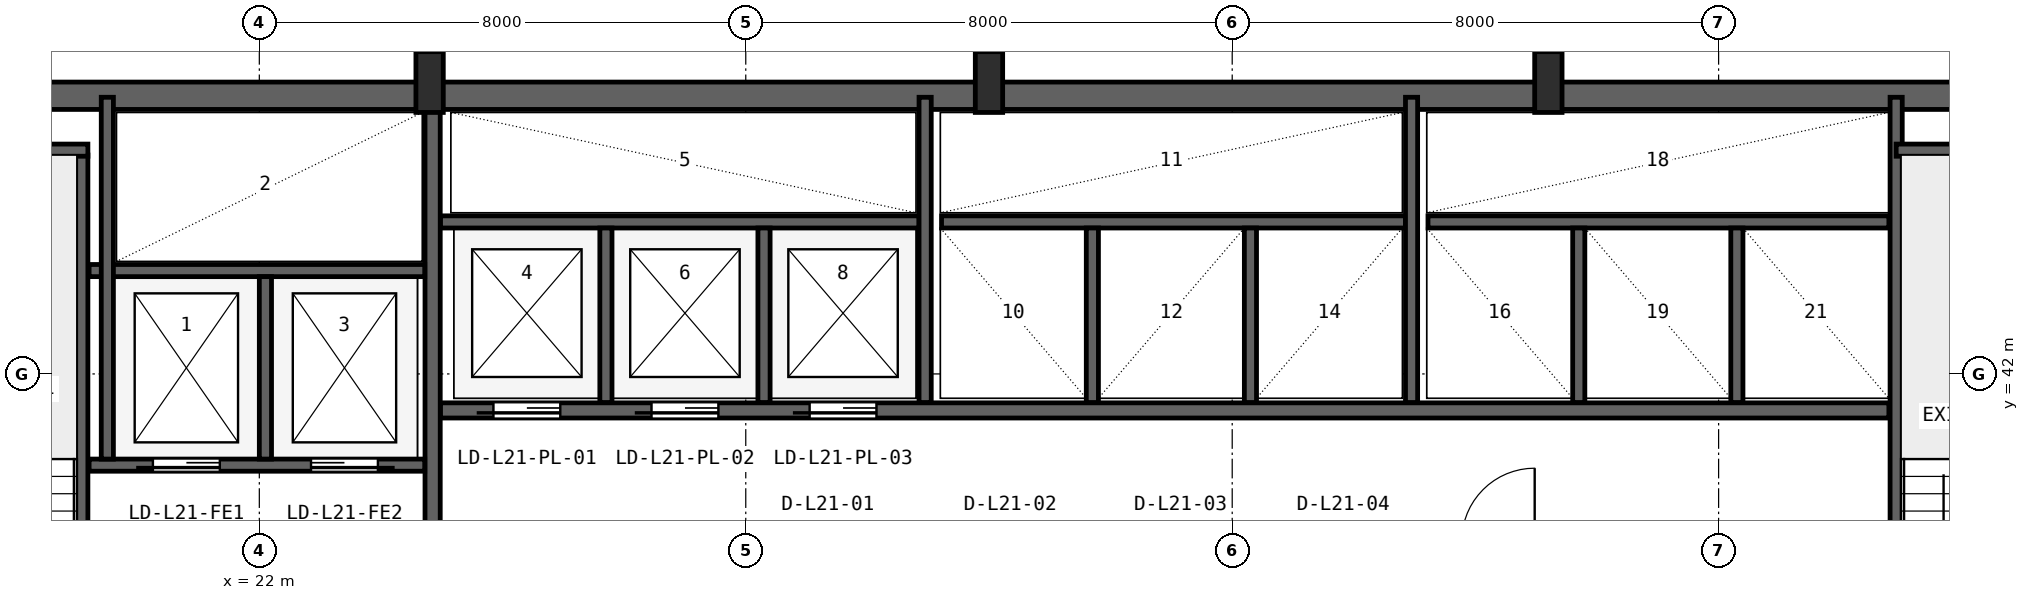
"""IFC4 building model, lengths in metres.
Left out: names, types, materials, properties, quantities, classifications, styles, units other than length and angle.
Written with IfcOpenShell. Run it as: python <this file> out.ifc"""

import sys

from ifc_helpers import new_model, si_unit, direction, frame, frame_2d, origin, origin_2d, place, context, subcontext, project, spatial, rectangle, i_section, extrude, source, transform, mapped, element, fill, save


model = new_model("IFC4")
c1 = context("Model", 3, precision=1e-05, world=origin(), true_north=direction((0.0, 1.0)))
c2 = subcontext(c1, "Body", "Model", "MODEL_VIEW")
j1 = project(units=[si_unit("LENGTHUNIT", "METRE"), si_unit("PLANEANGLEUNIT", "RADIAN")], contexts=[c1])
p1 = place(None, origin())
s1 = spatial("IfcSite", under=j1, at=p1, CompositionType="ELEMENT")
p2 = place(p1, origin())
s2 = spatial("IfcBuilding", under=s1, at=p2, CompositionType="ELEMENT")
p3 = place(p2, frame((0.0, 0.0, 90.8)))
s3 = spatial("IfcBuildingStorey", under=s2, at=p3, CompositionType="ELEMENT", Elevation=90.8)
p4 = place(p3, frame((15.6, 46.575, 0.0), z_axis=(0.0, 0.0, 1.0), x_axis=(1.0, 0.0, 0.0)))
e1 = element("IfcWall", 1, at=p4, inside=s3, PredefinedType="SHEAR", context=c2, shape_type="SweptSolid", body=[
    extrude(rectangle(XDim=36.8, YDim=0.45, at=frame_2d((18.4, 0.0))), origin(), (0.0, 0.0, 1.0), 3.55),
])
m1 = source(origin(), c2, "Body", "SweptSolid", [
    extrude(i_section(OverallWidth=0.45, OverallDepth=1.0, WebThickness=0.016, FlangeThickness=0.03, FilletRadius=0.016, at=origin_2d()), origin(), (0.0, 0.0, 1.0), 3.8),
])
for number, where, z_axis, x_axis in (
    (2, (24.8, 46.8, 0.0), (0.0, 0.0, 1.0), (1.0, 0.0, 0.0)),
    (3, (34.0, 46.8, 0.0), (0.0, 0.0, 1.0), (1.0, 0.0, 0.0)),
    (4, (43.2, 46.8, 0.0), (0.0, 0.0, 1.0), (1.0, 0.0, 0.0)),
):
    element("IfcColumn", number, at=place(p3, frame(where, z_axis=z_axis, x_axis=x_axis)), inside=s3, PredefinedType="COLUMN", context=c2, shape_type="MappedRepresentation", body=[
        mapped(m1, transform((0.0, 0.0, 0.0), x_axis=(1.0, 0.0, 0.0), y_axis=(0.0, 1.0, 0.0), z_axis=(0.0, 0.0, 1.0), scale=1.0)),
    ])
p5 = place(p3, frame((19.08, 35.95, 0.0), z_axis=(0.0, 0.0, 1.0), x_axis=(0.0, 1.0, 0.0)))
e5 = element("IfcWall", 5, at=p5, inside=s3, PredefinedType="SHEAR", context=c2, shape_type="SweptSolid", body=[
    extrude(rectangle(XDim=9.65, YDim=0.2, at=frame_2d((4.825, 0.0))), origin(), (0.0, 0.0, 1.0), 3.55),
])
p6 = place(p5, frame((0.25, 0.0, 0.0)))
e6 = element("IfcOpeningElement", 6, at=p6, cuts=e5, PredefinedType="OPENING", context=c2, shape_type="SweptSolid", body=[
    extrude(rectangle(XDim=0.95, YDim=2.1, at=frame_2d((0.475, 1.05))), frame((0.0, 0.11, 0.0), z_axis=(0.0, -1.0, 0.0), x_axis=(1.0, 0.0, 0.0)), (0.0, 0.0, 1.0), 0.22),
])
p7 = place(p3, frame((15.95, 45.68, 0.0), z_axis=(0.0, 0.0, 1.0), x_axis=(1.0, 0.0, 0.0)))
e7 = element("IfcWall", 7, at=p7, inside=s3, PredefinedType="SHEAR", context=c2, shape_type="SweptSolid", body=[
    extrude(rectangle(XDim=3.23, YDim=0.2, at=frame_2d((1.615, 0.0))), origin(), (0.0, 0.0, 1.0), 3.55),
])
p8 = place(p3, frame((24.85, 36.05, 0.0), z_axis=(0.0, 0.0, 1.0), x_axis=(0.0, 1.0, 0.0)))
e8 = element("IfcWall", 8, at=p8, inside=s3, PredefinedType="SHEAR", context=c2, shape_type="SweptSolid", body=[
    extrude(rectangle(XDim=10.45, YDim=0.25, at=frame_2d((5.225, 0.0))), origin(), (0.0, 0.0, 1.0), 3.55),
])
p9 = place(p3, frame((19.2, 40.5, 0.0), z_axis=(0.0, 0.0, 1.0), x_axis=(1.0, 0.0, 0.0)))
e9 = element("IfcWall", 9, at=p9, inside=s3, PredefinedType="SHEAR", context=c2, shape_type="SweptSolid", body=[
    extrude(rectangle(XDim=5.52, YDim=0.2, at=frame_2d((2.76, 0.0))), origin(), (0.0, 0.0, 1.0), 3.55),
])
p10 = place(p9, frame((1.05, 0.0, 0.0)))
e10 = element("IfcOpeningElement", 10, at=p10, cuts=e9, PredefinedType="OPENING", context=c2, shape_type="SweptSolid", body=[
    extrude(rectangle(XDim=1.1, YDim=2.18, at=frame_2d((0.55, 1.09))), frame((0.0, 0.11, 0.0), z_axis=(0.0, -1.0, 0.0), x_axis=(1.0, 0.0, 0.0)), (0.0, 0.0, 1.0), 0.22),
])
p11 = place(p9, frame((3.65, 0.0, 0.0)))
e11 = element("IfcOpeningElement", 11, at=p11, cuts=e9, PredefinedType="OPENING", context=c2, shape_type="SweptSolid", body=[
    extrude(rectangle(XDim=1.1, YDim=2.18, at=frame_2d((0.55, 1.09))), frame((0.0, 0.11, 0.0), z_axis=(0.0, -1.0, 0.0), x_axis=(1.0, 0.0, 0.0)), (0.0, 0.0, 1.0), 0.22),
])
p12 = place(p3, frame((19.2, 43.7, 0.0), z_axis=(0.0, 0.0, 1.0), x_axis=(1.0, 0.0, 0.0)))
e12 = element("IfcWall", 12, at=p12, inside=s3, PredefinedType="SHEAR", context=c2, shape_type="SweptSolid", body=[
    extrude(rectangle(XDim=5.52, YDim=0.2, at=frame_2d((2.76, 0.0))), origin(), (0.0, 0.0, 1.0), 3.55),
])
p13 = place(p3, frame((22.1, 40.6, 0.0), z_axis=(0.0, 0.0, 1.0), x_axis=(0.0, 1.0, 0.0)))
e13 = element("IfcWall", 13, at=p13, inside=s3, PredefinedType="SHEAR", context=c2, shape_type="SweptSolid", body=[
    extrude(rectangle(XDim=3.0, YDim=0.2, at=frame_2d((1.5, 0.0))), origin(), (0.0, 0.0, 1.0), 3.55),
])
p14 = place(p3, frame((19.5, 40.6, 0.0), z_axis=(0.0, 0.0, 1.0), x_axis=(0.0, 1.0, 0.0)))
e14 = element("IfcWall", 14, at=p14, inside=s3, PredefinedType="SHEAR", context=c2, shape_type="SweptSolid", body=[
    extrude(rectangle(XDim=5.95, YDim=0.2, at=frame_2d((2.975, 0.0))), origin(), (0.0, 0.0, 1.0), 3.55),
])
p15 = place(p3, frame((48.92, 36.05, 0.0), z_axis=(0.0, 0.0, 1.0), x_axis=(0.0, 1.0, 0.0)))
e15 = element("IfcWall", 15, at=p15, inside=s3, PredefinedType="SHEAR", context=c2, shape_type="SweptSolid", body=[
    extrude(rectangle(XDim=10.5, YDim=0.2, at=frame_2d((5.25, 0.0))), origin(), (0.0, 0.0, 1.0), 3.55),
])
p16 = place(p3, frame((48.92, 45.68, 0.0), z_axis=(0.0, 0.0, 1.0), x_axis=(1.0, 0.0, 0.0)))
e16 = element("IfcWall", 16, at=p16, inside=s3, PredefinedType="SHEAR", context=c2, shape_type="SweptSolid", body=[
    extrude(rectangle(XDim=3.18, YDim=0.2, at=frame_2d((1.59, 0.0))), origin(), (0.0, 0.0, 1.0), 3.55),
])
p17 = place(p3, frame((24.98, 41.4, 0.0), z_axis=(0.0, 0.0, 1.0), x_axis=(1.0, 0.0, 0.0)))
e17 = element("IfcWall", 17, at=p17, inside=s3, PredefinedType="SHEAR", context=c2, shape_type="SweptSolid", body=[
    extrude(rectangle(XDim=23.82, YDim=0.25, at=frame_2d((11.91, 0.0))), origin(), (0.0, 0.0, 1.0), 3.55),
])
p18 = place(p17, frame((0.87, 0.0, 0.0)))
e18 = element("IfcOpeningElement", 18, at=p18, cuts=e17, PredefinedType="OPENING", context=c2, shape_type="SweptSolid", body=[
    extrude(rectangle(XDim=1.1, YDim=2.18, at=frame_2d((0.55, 1.09))), frame((0.0, 0.135, 0.0), z_axis=(0.0, -1.0, 0.0), x_axis=(1.0, 0.0, 0.0)), (0.0, 0.0, 1.0), 0.27),
])
p19 = place(p17, frame((3.47, 0.0, 0.0)))
e19 = element("IfcOpeningElement", 19, at=p19, cuts=e17, PredefinedType="OPENING", context=c2, shape_type="SweptSolid", body=[
    extrude(rectangle(XDim=1.1, YDim=2.18, at=frame_2d((0.55, 1.09))), frame((0.0, 0.135, 0.0), z_axis=(0.0, -1.0, 0.0), x_axis=(1.0, 0.0, 0.0)), (0.0, 0.0, 1.0), 0.27),
])
p20 = place(p17, frame((6.07, 0.0, 0.0)))
e20 = element("IfcOpeningElement", 20, at=p20, cuts=e17, PredefinedType="OPENING", context=c2, shape_type="SweptSolid", body=[
    extrude(rectangle(XDim=1.1, YDim=2.18, at=frame_2d((0.55, 1.09))), frame((0.0, 0.135, 0.0), z_axis=(0.0, -1.0, 0.0), x_axis=(1.0, 0.0, 0.0)), (0.0, 0.0, 1.0), 0.27),
])
p21 = place(p3, frame((24.98, 44.5, 0.0), z_axis=(0.0, 0.0, 1.0), x_axis=(1.0, 0.0, 0.0)))
e21 = element("IfcWall", 21, at=p21, inside=s3, PredefinedType="SHEAR", context=c2, shape_type="SweptSolid", body=[
    extrude(rectangle(XDim=7.87, YDim=0.2, at=frame_2d((3.935, 0.0))), origin(), (0.0, 0.0, 1.0), 3.55),
])
for number, where, z_axis, x_axis in (
    (22, (27.7, 41.53, 0.0), (0.0, 0.0, 1.0), (0.0, 1.0, 0.0)),
    (23, (30.3, 41.53, 0.0), (0.0, 0.0, 1.0), (0.0, 1.0, 0.0)),
):
    element("IfcWall", number, at=place(p3, frame(where, z_axis=z_axis, x_axis=x_axis)), inside=s3, PredefinedType="SHEAR", context=c2, shape_type="SweptSolid", body=[
        extrude(rectangle(XDim=2.87, YDim=0.2, at=frame_2d((1.435, 0.0))), origin(), (0.0, 0.0, 1.0), 3.55),
    ])
p22 = place(p3, frame((32.95, 41.53, 0.0), z_axis=(0.0, 0.0, 1.0), x_axis=(0.0, 1.0, 0.0)))
e24 = element("IfcWall", 24, at=p22, inside=s3, PredefinedType="SHEAR", context=c2, shape_type="SweptSolid", body=[
    extrude(rectangle(XDim=5.02, YDim=0.2, at=frame_2d((2.51, 0.0))), origin(), (0.0, 0.0, 1.0), 3.55),
])
p23 = place(p3, frame((33.22, 44.5, 0.0), z_axis=(0.0, 0.0, 1.0), x_axis=(1.0, 0.0, 0.0)))
e25 = element("IfcWall", 25, at=p23, inside=s3, PredefinedType="SHEAR", context=c2, shape_type="SweptSolid", body=[
    extrude(rectangle(XDim=7.63, YDim=0.2, at=frame_2d((3.815, 0.0))), origin(), (0.0, 0.0, 1.0), 3.55),
])
for number, where, z_axis, x_axis in (
    (26, (35.7, 41.53, 0.0), (0.0, 0.0, 1.0), (0.0, 1.0, 0.0)),
    (27, (38.3, 41.53, 0.0), (0.0, 0.0, 1.0), (0.0, 1.0, 0.0)),
):
    element("IfcWall", number, at=place(p3, frame(where, z_axis=z_axis, x_axis=x_axis)), inside=s3, PredefinedType="SHEAR", context=c2, shape_type="SweptSolid", body=[
        extrude(rectangle(XDim=2.87, YDim=0.2, at=frame_2d((1.435, 0.0))), origin(), (0.0, 0.0, 1.0), 3.55),
    ])
p24 = place(p3, frame((40.95, 41.53, 0.0), z_axis=(0.0, 0.0, 1.0), x_axis=(0.0, 1.0, 0.0)))
e28 = element("IfcWall", 28, at=p24, inside=s3, PredefinedType="SHEAR", context=c2, shape_type="SweptSolid", body=[
    extrude(rectangle(XDim=5.02, YDim=0.2, at=frame_2d((2.51, 0.0))), origin(), (0.0, 0.0, 1.0), 3.55),
])
p25 = place(p3, frame((41.22, 44.5, 0.0), z_axis=(0.0, 0.0, 1.0), x_axis=(1.0, 0.0, 0.0)))
e29 = element("IfcWall", 29, at=p25, inside=s3, PredefinedType="SHEAR", context=c2, shape_type="SweptSolid", body=[
    extrude(rectangle(XDim=7.58, YDim=0.2, at=frame_2d((3.79, 0.0))), origin(), (0.0, 0.0, 1.0), 3.55),
])
for number, where, z_axis, x_axis in (
    (30, (43.7, 41.53, 0.0), (0.0, 0.0, 1.0), (0.0, 1.0, 0.0)),
    (31, (46.3, 41.53, 0.0), (0.0, 0.0, 1.0), (0.0, 1.0, 0.0)),
):
    element("IfcWall", number, at=place(p3, frame(where, z_axis=z_axis, x_axis=x_axis)), inside=s3, PredefinedType="SHEAR", context=c2, shape_type="SweptSolid", body=[
        extrude(rectangle(XDim=2.87, YDim=0.2, at=frame_2d((1.435, 0.0))), origin(), (0.0, 0.0, 1.0), 3.55),
    ])
m2 = source(origin(), c2, "Body", "SweptSolid", [
    extrude(rectangle(XDim=1.1, YDim=2.18, at=frame_2d((0.55, 1.09))), frame((0.0, 0.025, 0.0), z_axis=(0.0, -1.0, 0.0), x_axis=(1.0, 0.0, 0.0)), (0.0, 0.0, 1.0), 0.05),
])
p26 = place(p10, frame((1.1, 0.0, 0.0), z_axis=(0.0, 0.0, 1.0), x_axis=(-1.0, 0.0, 0.0)))
e32 = element("IfcDoor", 32, at=p26, inside=s3, OperationType="SLIDING_TO_LEFT", PredefinedType="DOOR", context=c2, shape_type="MappedRepresentation", body=[
    mapped(m2, transform((0.0, 0.0, 0.0), x_axis=(1.0, 0.0, 0.0), y_axis=(0.0, 1.0, 0.0), z_axis=(0.0, 0.0, 1.0), scale=1.0)),
])
fill(e10, e32)
p27 = place(p11, frame((1.1, 0.0, 0.0), z_axis=(0.0, 0.0, 1.0), x_axis=(-1.0, 0.0, 0.0)))
e33 = element("IfcDoor", 33, at=p27, inside=s3, OperationType="SLIDING_TO_RIGHT", PredefinedType="DOOR", context=c2, shape_type="MappedRepresentation", body=[
    mapped(m2, transform((0.0, 0.0, 0.0), x_axis=(1.0, 0.0, 0.0), y_axis=(0.0, 1.0, 0.0), z_axis=(0.0, 0.0, 1.0), scale=1.0)),
])
fill(e11, e33)
p28 = place(p18, frame((1.1, 0.0, 0.0), z_axis=(0.0, 0.0, 1.0), x_axis=(-1.0, 0.0, 0.0)))
e34 = element("IfcDoor", 34, at=p28, inside=s3, OperationType="SLIDING_TO_LEFT", PredefinedType="DOOR", context=c2, shape_type="MappedRepresentation", body=[
    mapped(m2, transform((0.0, 0.0, 0.0), x_axis=(1.0, 0.0, 0.0), y_axis=(0.0, 1.0, 0.0), z_axis=(0.0, 0.0, 1.0), scale=1.0)),
])
fill(e18, e34)
p29 = place(p19, frame((1.1, 0.0, 0.0), z_axis=(0.0, 0.0, 1.0), x_axis=(-1.0, 0.0, 0.0)))
e35 = element("IfcDoor", 35, at=p29, inside=s3, OperationType="SLIDING_TO_LEFT", PredefinedType="DOOR", context=c2, shape_type="MappedRepresentation", body=[
    mapped(m2, transform((0.0, 0.0, 0.0), x_axis=(1.0, 0.0, 0.0), y_axis=(0.0, 1.0, 0.0), z_axis=(0.0, 0.0, 1.0), scale=1.0)),
])
fill(e19, e35)
p30 = place(p20, frame((1.1, 0.0, 0.0), z_axis=(0.0, 0.0, 1.0), x_axis=(-1.0, 0.0, 0.0)))
e36 = element("IfcDoor", 36, at=p30, inside=s3, OperationType="SLIDING_TO_LEFT", PredefinedType="DOOR", context=c2, shape_type="MappedRepresentation", body=[
    mapped(m2, transform((0.0, 0.0, 0.0), x_axis=(1.0, 0.0, 0.0), y_axis=(0.0, 1.0, 0.0), z_axis=(0.0, 0.0, 1.0), scale=1.0)),
])
fill(e20, e36)
save(model, sys.argv[1])
